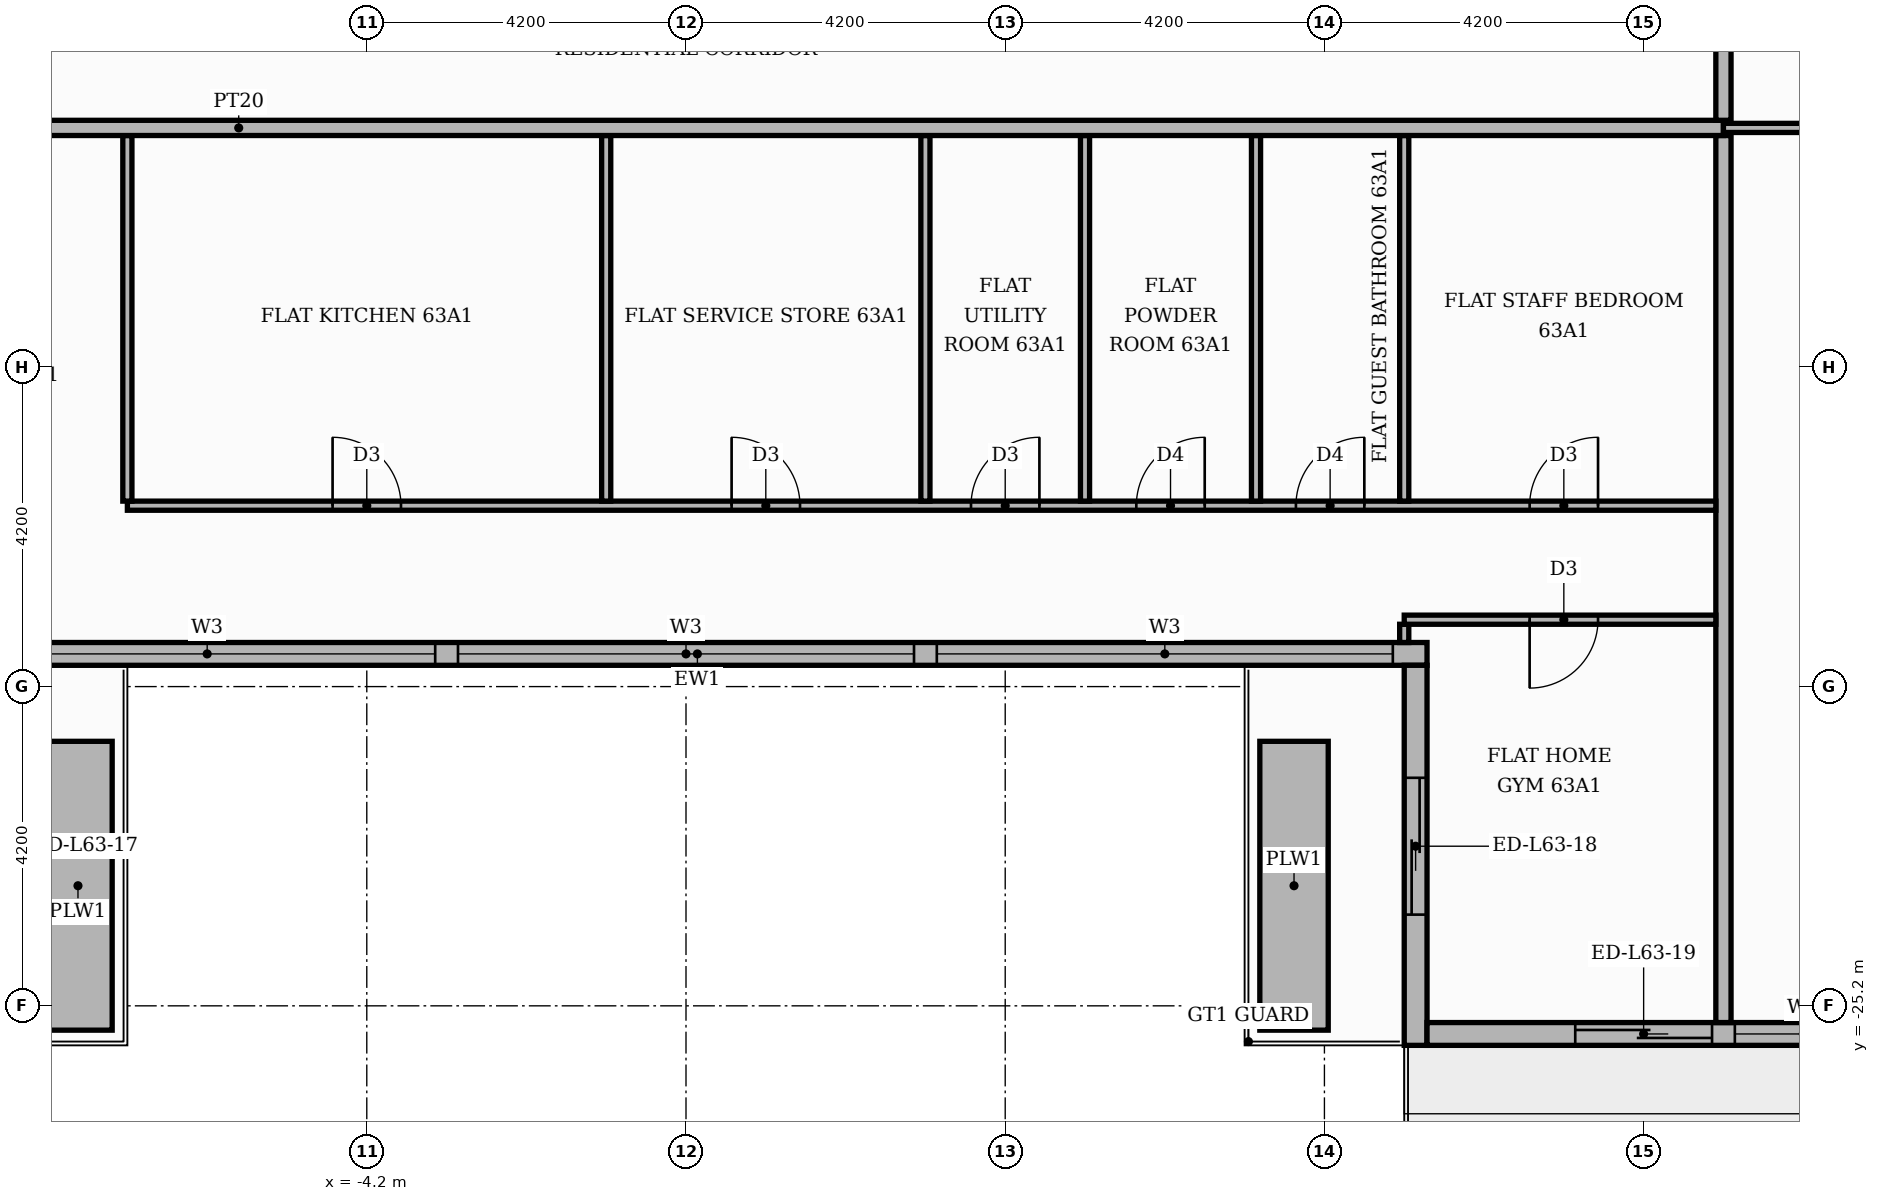
"""IFC4 building model, lengths in metres.
Left out: names, types, materials, properties, quantities, classifications, styles, units other than length and angle.
Written with IfcOpenShell. Run it as: python <this file> out.ifc"""

import sys

from ifc_helpers import new_model, si_unit, direction, frame, frame_2d, origin, place, context, subcontext, project, spatial, rectangle, extrude, element, fill, save


model = new_model("IFC4")
c1 = context("Model", 3, precision=1e-05, world=origin(), true_north=direction((0.0, 1.0)))
c2 = subcontext(c1, "Body", "Model", "MODEL_VIEW")
j1 = project(units=[si_unit("LENGTHUNIT", "METRE"), si_unit("PLANEANGLEUNIT", "RADIAN")], contexts=[c1])
p1 = place(None, origin())
s1 = spatial("IfcSite", under=j1, at=p1, CompositionType="ELEMENT")
p2 = place(p1, origin())
s2 = spatial("IfcBuilding", under=s1, at=p2, CompositionType="ELEMENT")
p3 = place(p2, frame((0.0, 0.0, 264.0)))
s3 = spatial("IfcBuildingStorey", under=s2, at=p3, CompositionType="ELEMENT", Elevation=264.0)
p4 = place(p3, frame((-9.45, -20.57, 0.0), z_axis=(0.0, 0.0, 1.0), x_axis=(1.0, 0.0, 0.0)))
e1 = element("IfcWall", 1, at=p4, inside=s3, PredefinedType="STANDARD", context=c2, shape_type="SweptSolid", body=[
    extrude(rectangle(XDim=19.2, YDim=0.3, at=frame_2d((9.6, 0.0))), origin(), (0.0, 0.0, 1.0), 3.48),
])
p5 = place(p4, frame((0.15, 0.0, 0.9)))
e2 = element("IfcOpeningElement", 2, at=p5, cuts=e1, PredefinedType="OPENING", context=c2, shape_type="SweptSolid", body=[
    extrude(rectangle(XDim=6.0, YDim=2.1, at=frame_2d((3.0, 1.05))), frame((0.0, 0.16, 0.0), z_axis=(0.0, -1.0, 0.0), x_axis=(1.0, 0.0, 0.0)), (0.0, 0.0, 1.0), 0.32),
])
p6 = place(p4, frame((6.45, 0.0, 0.9)))
e3 = element("IfcOpeningElement", 3, at=p6, cuts=e1, PredefinedType="OPENING", context=c2, shape_type="SweptSolid", body=[
    extrude(rectangle(XDim=6.0, YDim=2.1, at=frame_2d((3.0, 1.05))), frame((0.0, 0.16, 0.0), z_axis=(0.0, -1.0, 0.0), x_axis=(1.0, 0.0, 0.0)), (0.0, 0.0, 1.0), 0.32),
])
p7 = place(p4, frame((12.75, 0.0, 0.9)))
e4 = element("IfcOpeningElement", 4, at=p7, cuts=e1, PredefinedType="OPENING", context=c2, shape_type="SweptSolid", body=[
    extrude(rectangle(XDim=6.0, YDim=2.1, at=frame_2d((3.0, 1.05))), frame((0.0, 0.16, 0.0), z_axis=(0.0, -1.0, 0.0), x_axis=(1.0, 0.0, 0.0)), (0.0, 0.0, 1.0), 0.32),
])
p8 = place(p3, frame((9.6, -20.72, 0.0), z_axis=(0.0, 0.0, 1.0), x_axis=(0.0, -1.0, 0.0)))
e5 = element("IfcWall", 5, at=p8, inside=s3, PredefinedType="STANDARD", context=c2, shape_type="SweptSolid", body=[
    extrude(rectangle(XDim=5.0, YDim=0.3, at=frame_2d((2.5, 0.0))), origin(), (0.0, 0.0, 1.0), 3.48),
])
p9 = place(p8, frame((1.48, 0.0, 0.0)))
e6 = element("IfcOpeningElement", 6, at=p9, cuts=e5, PredefinedType="OPENING", context=c2, shape_type="SweptSolid", body=[
    extrude(rectangle(XDim=1.8, YDim=2.4, at=frame_2d((0.9, 1.2))), frame((0.0, 0.16, 0.0), z_axis=(0.0, -1.0, 0.0), x_axis=(1.0, 0.0, 0.0)), (0.0, 0.0, 1.0), 0.32),
])
p10 = place(p3, frame((9.75, -25.57, 0.0), z_axis=(0.0, 0.0, 1.0), x_axis=(1.0, 0.0, 0.0)))
e7 = element("IfcWall", 7, at=p10, inside=s3, PredefinedType="STANDARD", context=c2, shape_type="SweptSolid", body=[
    extrude(rectangle(XDim=6.45, YDim=0.3, at=frame_2d((3.225, 0.0))), origin(), (0.0, 0.0, 1.0), 3.48),
])
p11 = place(p10, frame((1.95, 0.0, 0.0)))
e8 = element("IfcOpeningElement", 8, at=p11, cuts=e7, PredefinedType="OPENING", context=c2, shape_type="SweptSolid", body=[
    extrude(rectangle(XDim=1.8, YDim=2.4, at=frame_2d((0.9, 1.2))), frame((0.0, 0.16, 0.0), z_axis=(0.0, -1.0, 0.0), x_axis=(1.0, 0.0, 0.0)), (0.0, 0.0, 1.0), 0.32),
])
p12 = place(p10, frame((4.05, 0.0, 0.9)))
e9 = element("IfcOpeningElement", 9, at=p12, cuts=e7, PredefinedType="OPENING", context=c2, shape_type="SweptSolid", body=[
    extrude(rectangle(XDim=1.8, YDim=2.1, at=frame_2d((0.9, 1.05))), frame((0.0, 0.16, 0.0), z_axis=(0.0, -1.0, 0.0), x_axis=(1.0, 0.0, 0.0)), (0.0, 0.0, 1.0), 0.32),
])
for number, where, z_axis, x_axis in (
    (10, (8.0, -25.52, 0.0), (0.0, 0.0, 1.0), (0.0, 1.0, 0.0)),
    (11, (-8.0, -25.52, 0.0), (0.0, 0.0, 1.0), (0.0, 1.0, 0.0)),
):
    element("IfcWall", number, at=place(p3, frame(where, z_axis=z_axis, x_axis=x_axis)), inside=s3, PredefinedType="MOVABLE", context=c2, shape_type="SweptSolid", body=[
        extrude(rectangle(XDim=3.8, YDim=0.9, at=frame_2d((1.9, 0.0))), origin(), (0.0, 0.0, 1.0), 0.6),
    ])
p13 = place(p3, frame((13.65, -25.42, 0.0), z_axis=(0.0, 0.0, 1.0), x_axis=(0.0, 1.0, 0.0)))
e12 = element("IfcWall", 12, at=p13, inside=s3, PredefinedType="PARTITIONING", context=c2, shape_type="SweptSolid", body=[
    extrude(rectangle(XDim=11.67, YDim=0.2, at=frame_2d((5.835, 0.0))), origin(), (0.0, 0.0, 1.0), 3.48),
])
p14 = place(p3, frame((9.45, -20.42, 0.0), z_axis=(0.0, 0.0, 1.0), x_axis=(0.0, 1.0, 0.0)))
e13 = element("IfcWall", 13, at=p14, inside=s3, PredefinedType="PARTITIONING", context=c2, shape_type="SweptSolid", body=[
    extrude(rectangle(XDim=0.24, YDim=0.12, at=frame_2d((0.12, 0.0))), origin(), (0.0, 0.0, 1.0), 3.48),
])
p15 = place(p3, frame((9.45, -20.12, 0.0), z_axis=(0.0, 0.0, 1.0), x_axis=(1.0, 0.0, 0.0)))
e14 = element("IfcWall", 14, at=p15, inside=s3, PredefinedType="PARTITIONING", context=c2, shape_type="SweptSolid", body=[
    extrude(rectangle(XDim=4.1, YDim=0.12, at=frame_2d((2.05, 0.0))), origin(), (0.0, 0.0, 1.0), 3.48),
])
p16 = place(p15, frame((1.65, 0.0, 0.0)))
e15 = element("IfcOpeningElement", 15, at=p16, cuts=e14, PredefinedType="OPENING", context=c2, shape_type="SweptSolid", body=[
    extrude(rectangle(XDim=0.9, YDim=2.1, at=frame_2d((0.45, 1.05))), frame((0.0, 0.07, 0.0), z_axis=(0.0, -1.0, 0.0), x_axis=(1.0, 0.0, 0.0)), (0.0, 0.0, 1.0), 0.14),
])
p17 = place(p3, frame((-7.35, -18.62, 0.0), z_axis=(0.0, 0.0, 1.0), x_axis=(1.0, 0.0, 0.0)))
e16 = element("IfcWall", 16, at=p17, inside=s3, PredefinedType="PARTITIONING", context=c2, shape_type="SweptSolid", body=[
    extrude(rectangle(XDim=20.9, YDim=0.12, at=frame_2d((10.45, 0.0))), origin(), (0.0, 0.0, 1.0), 3.48),
])
p18 = place(p17, frame((2.7, 0.0, 0.0)))
e17 = element("IfcOpeningElement", 17, at=p18, cuts=e16, PredefinedType="OPENING", context=c2, shape_type="SweptSolid", body=[
    extrude(rectangle(XDim=0.9, YDim=2.1, at=frame_2d((0.45, 1.05))), frame((0.0, 0.07, 0.0), z_axis=(0.0, -1.0, 0.0), x_axis=(1.0, 0.0, 0.0)), (0.0, 0.0, 1.0), 0.14),
])
p19 = place(p17, frame((7.95, 0.0, 0.0)))
e18 = element("IfcOpeningElement", 18, at=p19, cuts=e16, PredefinedType="OPENING", context=c2, shape_type="SweptSolid", body=[
    extrude(rectangle(XDim=0.9, YDim=2.1, at=frame_2d((0.45, 1.05))), frame((0.0, 0.07, 0.0), z_axis=(0.0, -1.0, 0.0), x_axis=(1.0, 0.0, 0.0)), (0.0, 0.0, 1.0), 0.14),
])
p20 = place(p17, frame((11.1, 0.0, 0.0)))
e19 = element("IfcOpeningElement", 19, at=p20, cuts=e16, PredefinedType="OPENING", context=c2, shape_type="SweptSolid", body=[
    extrude(rectangle(XDim=0.9, YDim=2.1, at=frame_2d((0.45, 1.05))), frame((0.0, 0.07, 0.0), z_axis=(0.0, -1.0, 0.0), x_axis=(1.0, 0.0, 0.0)), (0.0, 0.0, 1.0), 0.14),
])
p21 = place(p17, frame((13.275, 0.0, 0.0)))
e20 = element("IfcOpeningElement", 20, at=p21, cuts=e16, PredefinedType="OPENING", context=c2, shape_type="SweptSolid", body=[
    extrude(rectangle(XDim=0.9, YDim=2.1, at=frame_2d((0.45, 1.05))), frame((0.0, 0.07, 0.0), z_axis=(0.0, -1.0, 0.0), x_axis=(1.0, 0.0, 0.0)), (0.0, 0.0, 1.0), 0.14),
])
p22 = place(p17, frame((15.375, 0.0, 0.0)))
e21 = element("IfcOpeningElement", 21, at=p22, cuts=e16, PredefinedType="OPENING", context=c2, shape_type="SweptSolid", body=[
    extrude(rectangle(XDim=0.9, YDim=2.1, at=frame_2d((0.45, 1.05))), frame((0.0, 0.07, 0.0), z_axis=(0.0, -1.0, 0.0), x_axis=(1.0, 0.0, 0.0)), (0.0, 0.0, 1.0), 0.14),
])
p23 = place(p17, frame((18.45, 0.0, 0.0)))
e22 = element("IfcOpeningElement", 22, at=p23, cuts=e16, PredefinedType="OPENING", context=c2, shape_type="SweptSolid", body=[
    extrude(rectangle(XDim=0.9, YDim=2.1, at=frame_2d((0.45, 1.05))), frame((0.0, 0.07, 0.0), z_axis=(0.0, -1.0, 0.0), x_axis=(1.0, 0.0, 0.0)), (0.0, 0.0, 1.0), 0.14),
])
for number, where, z_axis, x_axis in (
    (23, (-7.35, -18.56, 0.0), (0.0, 0.0, 1.0), (0.0, 1.0, 0.0)),
    (24, (-1.05, -18.56, 0.0), (0.0, 0.0, 1.0), (0.0, 1.0, 0.0)),
    (25, (3.15, -18.56, 0.0), (0.0, 0.0, 1.0), (0.0, 1.0, 0.0)),
    (26, (5.25, -18.56, 0.0), (0.0, 0.0, 1.0), (0.0, 1.0, 0.0)),
    (27, (7.5, -18.56, 0.0), (0.0, 0.0, 1.0), (0.0, 1.0, 0.0)),
    (28, (9.45, -18.56, 0.0), (0.0, 0.0, 1.0), (0.0, 1.0, 0.0)),
):
    element("IfcWall", number, at=place(p3, frame(where, z_axis=z_axis, x_axis=x_axis)), inside=s3, PredefinedType="PARTITIONING", context=c2, shape_type="SweptSolid", body=[
        extrude(rectangle(XDim=4.81, YDim=0.12, at=frame_2d((2.405, 0.0))), origin(), (0.0, 0.0, 1.0), 3.48),
    ])
p24 = place(p3, frame((-25.42, -13.65, 0.0), z_axis=(0.0, 0.0, 1.0), x_axis=(1.0, 0.0, 0.0)))
e29 = element("IfcWall", 29, at=p24, inside=s3, PredefinedType="PARTITIONING", context=c2, shape_type="SweptSolid", body=[
    extrude(rectangle(XDim=39.07, YDim=0.2, at=frame_2d((19.535, 0.0))), origin(), (0.0, 0.0, 1.0), 3.48),
])
p25 = place(p24, frame((14.37, 0.0, 0.0)))
e30 = element("IfcOpeningElement", 30, at=p25, cuts=e29, PredefinedType="OPENING", context=c2, shape_type="SweptSolid", body=[
    extrude(rectangle(XDim=1.1, YDim=2.4, at=frame_2d((0.55, 1.2))), frame((0.0, 0.11, 0.0), z_axis=(0.0, -1.0, 0.0), x_axis=(1.0, 0.0, 0.0)), (0.0, 0.0, 1.0), 0.22),
])
p26 = place(p3, frame((13.65, -13.65, 0.0), z_axis=(0.0, 0.0, 1.0), x_axis=(1.0, 0.0, 0.0)))
e31 = element("IfcWall", 31, at=p26, inside=s3, PredefinedType="PARTITIONING", context=c2, shape_type="SweptSolid", body=[
    extrude(rectangle(XDim=6.17, YDim=0.12, at=frame_2d((3.085, 0.0))), origin(), (0.0, 0.0, 1.0), 3.48),
])
p27 = place(p26, frame((2.635, 0.0, 0.0)))
e32 = element("IfcOpeningElement", 32, at=p27, cuts=e31, PredefinedType="OPENING", context=c2, shape_type="SweptSolid", body=[
    extrude(rectangle(XDim=0.9, YDim=2.1, at=frame_2d((0.45, 1.05))), frame((0.0, 0.07, 0.0), z_axis=(0.0, -1.0, 0.0), x_axis=(1.0, 0.0, 0.0)), (0.0, 0.0, 1.0), 0.14),
])
p28 = place(p3, frame((13.65, -13.55, 0.0), z_axis=(0.0, 0.0, 1.0), x_axis=(0.0, 1.0, 0.0)))
e33 = element("IfcWall", 33, at=p28, inside=s3, PredefinedType="PARTITIONING", context=c2, shape_type="SweptSolid", body=[
    extrude(rectangle(XDim=2.45, YDim=0.2, at=frame_2d((1.225, 0.0))), origin(), (0.0, 0.0, 1.0), 3.48),
])
p29 = place(p5, origin())
e34 = element("IfcWindow", 34, at=p29, inside=s3, PartitioningType="SINGLE_PANEL", PredefinedType="WINDOW", context=c2, shape_type="SweptSolid", body=[
    extrude(rectangle(XDim=6.0, YDim=2.1, at=frame_2d((3.0, 1.05))), frame((0.0, 0.03, 0.0), z_axis=(0.0, -1.0, 0.0), x_axis=(1.0, 0.0, 0.0)), (0.0, 0.0, 1.0), 0.06),
])
fill(e2, e34)
p30 = place(p6, origin())
e35 = element("IfcWindow", 35, at=p30, inside=s3, PartitioningType="SINGLE_PANEL", PredefinedType="WINDOW", context=c2, shape_type="SweptSolid", body=[
    extrude(rectangle(XDim=6.0, YDim=2.1, at=frame_2d((3.0, 1.05))), frame((0.0, 0.03, 0.0), z_axis=(0.0, -1.0, 0.0), x_axis=(1.0, 0.0, 0.0)), (0.0, 0.0, 1.0), 0.06),
])
fill(e3, e35)
p31 = place(p7, origin())
e36 = element("IfcWindow", 36, at=p31, inside=s3, PartitioningType="SINGLE_PANEL", PredefinedType="WINDOW", context=c2, shape_type="SweptSolid", body=[
    extrude(rectangle(XDim=6.0, YDim=2.1, at=frame_2d((3.0, 1.05))), frame((0.0, 0.03, 0.0), z_axis=(0.0, -1.0, 0.0), x_axis=(1.0, 0.0, 0.0)), (0.0, 0.0, 1.0), 0.06),
])
fill(e4, e36)
p32 = place(p9, origin())
e37 = element("IfcDoor", 37, at=p32, inside=s3, OperationType="SLIDING_TO_RIGHT", PredefinedType="DOOR", context=c2, shape_type="SweptSolid", body=[
    extrude(rectangle(XDim=1.8, YDim=2.4, at=frame_2d((0.9, 1.2))), frame((0.0, 0.025, 0.0), z_axis=(0.0, -1.0, 0.0), x_axis=(1.0, 0.0, 0.0)), (0.0, 0.0, 1.0), 0.05),
])
fill(e6, e37)
p33 = place(p11, origin())
e38 = element("IfcDoor", 38, at=p33, inside=s3, OperationType="SLIDING_TO_RIGHT", PredefinedType="DOOR", context=c2, shape_type="SweptSolid", body=[
    extrude(rectangle(XDim=1.8, YDim=2.4, at=frame_2d((0.9, 1.2))), frame((0.0, 0.025, 0.0), z_axis=(0.0, -1.0, 0.0), x_axis=(1.0, 0.0, 0.0)), (0.0, 0.0, 1.0), 0.05),
])
fill(e8, e38)
p34 = place(p12, origin())
e39 = element("IfcWindow", 39, at=p34, inside=s3, PartitioningType="SINGLE_PANEL", PredefinedType="WINDOW", context=c2, shape_type="SweptSolid", body=[
    extrude(rectangle(XDim=1.8, YDim=2.1, at=frame_2d((0.9, 1.05))), frame((0.0, 0.03, 0.0), z_axis=(0.0, -1.0, 0.0), x_axis=(1.0, 0.0, 0.0)), (0.0, 0.0, 1.0), 0.06),
])
fill(e9, e39)
p35 = place(p18, origin())
e40 = element("IfcDoor", 40, at=p35, inside=s3, OperationType="SINGLE_SWING_LEFT", PredefinedType="DOOR", context=c2, shape_type="SweptSolid", body=[
    extrude(rectangle(XDim=0.9, YDim=2.1, at=frame_2d((0.45, 1.05))), frame((0.0, 0.025, 0.0), z_axis=(0.0, -1.0, 0.0), x_axis=(1.0, 0.0, 0.0)), (0.0, 0.0, 1.0), 0.05),
])
fill(e17, e40)
p36 = place(p19, origin())
e41 = element("IfcDoor", 41, at=p36, inside=s3, OperationType="SINGLE_SWING_LEFT", PredefinedType="DOOR", context=c2, shape_type="SweptSolid", body=[
    extrude(rectangle(XDim=0.9, YDim=2.1, at=frame_2d((0.45, 1.05))), frame((0.0, 0.025, 0.0), z_axis=(0.0, -1.0, 0.0), x_axis=(1.0, 0.0, 0.0)), (0.0, 0.0, 1.0), 0.05),
])
fill(e18, e41)
p37 = place(p20, origin())
e42 = element("IfcDoor", 42, at=p37, inside=s3, OperationType="SINGLE_SWING_RIGHT", PredefinedType="DOOR", context=c2, shape_type="SweptSolid", body=[
    extrude(rectangle(XDim=0.9, YDim=2.1, at=frame_2d((0.45, 1.05))), frame((0.0, 0.025, 0.0), z_axis=(0.0, -1.0, 0.0), x_axis=(1.0, 0.0, 0.0)), (0.0, 0.0, 1.0), 0.05),
])
fill(e19, e42)
p38 = place(p21, origin())
e43 = element("IfcDoor", 43, at=p38, inside=s3, OperationType="SINGLE_SWING_RIGHT", PredefinedType="DOOR", context=c2, shape_type="SweptSolid", body=[
    extrude(rectangle(XDim=0.9, YDim=2.1, at=frame_2d((0.45, 1.05))), frame((0.0, 0.025, 0.0), z_axis=(0.0, -1.0, 0.0), x_axis=(1.0, 0.0, 0.0)), (0.0, 0.0, 1.0), 0.05),
])
fill(e20, e43)
p39 = place(p22, origin())
e44 = element("IfcDoor", 44, at=p39, inside=s3, OperationType="SINGLE_SWING_RIGHT", PredefinedType="DOOR", context=c2, shape_type="SweptSolid", body=[
    extrude(rectangle(XDim=0.9, YDim=2.1, at=frame_2d((0.45, 1.05))), frame((0.0, 0.025, 0.0), z_axis=(0.0, -1.0, 0.0), x_axis=(1.0, 0.0, 0.0)), (0.0, 0.0, 1.0), 0.05),
])
fill(e21, e44)
p40 = place(p23, origin())
e45 = element("IfcDoor", 45, at=p40, inside=s3, OperationType="SINGLE_SWING_RIGHT", PredefinedType="DOOR", context=c2, shape_type="SweptSolid", body=[
    extrude(rectangle(XDim=0.9, YDim=2.1, at=frame_2d((0.45, 1.05))), frame((0.0, 0.025, 0.0), z_axis=(0.0, -1.0, 0.0), x_axis=(1.0, 0.0, 0.0)), (0.0, 0.0, 1.0), 0.05),
])
fill(e22, e45)
p41 = place(p16, frame((0.9, 0.0, 0.0), z_axis=(0.0, 0.0, 1.0), x_axis=(-1.0, 0.0, 0.0)))
e46 = element("IfcDoor", 46, at=p41, inside=s3, OperationType="SINGLE_SWING_LEFT", PredefinedType="DOOR", context=c2, shape_type="SweptSolid", body=[
    extrude(rectangle(XDim=0.9, YDim=2.1, at=frame_2d((0.45, 1.05))), frame((0.0, 0.025, 0.0), z_axis=(0.0, -1.0, 0.0), x_axis=(1.0, 0.0, 0.0)), (0.0, 0.0, 1.0), 0.05),
])
fill(e15, e46)
save(model, sys.argv[1])
